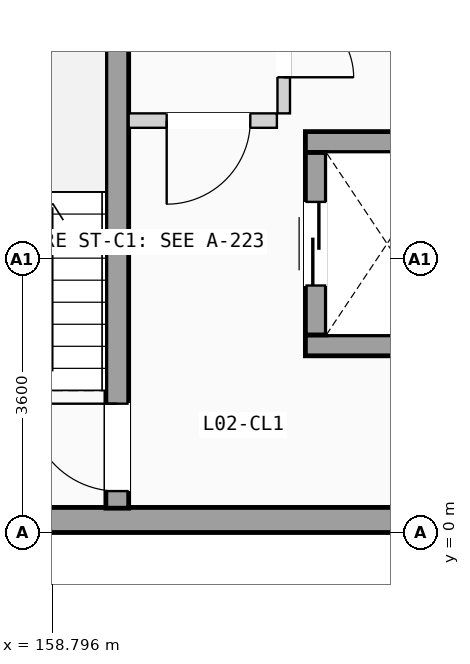
"""IFC4 building model, lengths in metres.
Left out: names, types, materials, properties, quantities, classifications, styles, units other than length and angle.
Written with IfcOpenShell. Run it as: python <this file> out.ifc"""

import sys

from ifc_helpers import new_model, si_unit, direction, frame, frame_2d, origin, place, context, subcontext, project, spatial, rectangle, extrude, element, fill, save


model = new_model("IFC4")
c1 = context("Model", 3, precision=1e-05, world=origin(), true_north=direction((0.0, 1.0)))
c2 = subcontext(c1, "Body", "Model", "MODEL_VIEW")
j1 = project(units=[si_unit("LENGTHUNIT", "METRE"), si_unit("PLANEANGLEUNIT", "RADIAN")], contexts=[c1])
p1 = place(None, origin())
s1 = spatial("IfcSite", under=j1, at=p1, CompositionType="ELEMENT")
p2 = place(p1, origin())
s2 = spatial("IfcBuilding", under=s1, at=p2, CompositionType="ELEMENT")
p3 = place(p2, frame((0.0, 0.0, 8.575)))
s3 = spatial("IfcBuildingStorey", under=s2, at=p3, CompositionType="ELEMENT", Elevation=8.575)
p4 = place(p3, frame((147.6, 0.165, 0.0), z_axis=(0.0, 0.0, 1.0), x_axis=(1.0, 0.0, 0.0)))
e1 = element("IfcWall", 1, at=p4, inside=s3, PredefinedType="SOLIDWALL", context=c2, shape_type="SweptSolid", body=[
    extrude(rectangle(XDim=25.2, YDim=0.33, at=frame_2d((12.6, 0.0))), origin(), (0.0, 0.0, 1.0), 3.24),
])
p5 = place(p3, frame((159.65, 0.32, 0.0), z_axis=(0.0, 0.0, 1.0), x_axis=(0.0, 1.0, 0.0)))
e2 = element("IfcWall", 2, at=p5, inside=s3, PredefinedType="SHEAR", context=c2, shape_type="SweptSolid", body=[
    extrude(rectangle(XDim=7.0, YDim=0.3, at=frame_2d((3.5, 0.0))), origin(), (0.0, 0.0, 1.0), 3.24),
])
p6 = place(p5, frame((0.225, 0.0, 0.0)))
e3 = element("IfcOpeningElement", 3, at=p6, cuts=e2, PredefinedType="OPENING", context=c2, shape_type="SweptSolid", body=[
    extrude(rectangle(XDim=1.15, YDim=2.12, at=frame_2d((0.575, 1.06))), frame((0.0, 0.16, 0.0), z_axis=(0.0, -1.0, 0.0), x_axis=(1.0, 0.0, 0.0)), (0.0, 0.0, 1.0), 0.32),
])
for number, where, z_axis, x_axis in (
    (4, (162.125, 2.462, 0.0), (0.0, 0.0, 1.0), (1.0, 0.0, 0.0)),
    (5, (162.125, 5.137, 0.0), (0.0, 0.0, 1.0), (1.0, 0.0, 0.0)),
):
    element("IfcWall", number, at=place(p3, frame(where, z_axis=z_axis, x_axis=x_axis)), inside=s3, PredefinedType="SHEAR", context=c2, shape_type="SweptSolid", body=[
        extrude(rectangle(XDim=2.15, YDim=0.275, at=frame_2d((1.075, 0.0))), origin(), (0.0, 0.0, 1.0), 3.24),
    ])
p7 = place(p3, frame((162.262, 2.6, 0.0), z_axis=(0.0, 0.0, 1.0), x_axis=(0.0, 1.0, 0.0)))
e6 = element("IfcWall", 6, at=p7, inside=s3, PredefinedType="SHEAR", context=c2, shape_type="SweptSolid", body=[
    extrude(rectangle(XDim=2.4, YDim=0.275, at=frame_2d((1.2, 0.0))), origin(), (0.0, 0.0, 1.0), 3.24),
])
p8 = place(p7, frame((0.65, 0.0, 0.0)))
e7 = element("IfcOpeningElement", 7, at=p8, cuts=e6, PredefinedType="OPENING", context=c2, shape_type="SweptSolid", body=[
    extrude(rectangle(XDim=1.1, YDim=2.15, at=frame_2d((0.55, 1.075))), frame((0.0, 0.147, 0.0), z_axis=(0.0, -1.0, 0.0), x_axis=(1.0, 0.0, 0.0)), (0.0, 0.0, 1.0), 0.295),
])
p9 = place(p3, frame((159.8, 5.42, 0.0), z_axis=(0.0, 0.0, 1.0), x_axis=(1.0, 0.0, 0.0)))
e8 = element("IfcWall", 8, at=p9, inside=s3, PredefinedType="PARTITIONING", context=c2, shape_type="SweptSolid", body=[
    extrude(rectangle(XDim=1.95, YDim=0.19, at=frame_2d((0.975, 0.0))), origin(), (0.0, 0.0, 1.0), 3.22),
])
p10 = place(p9, frame((0.5, 0.0, 0.0)))
e9 = element("IfcOpeningElement", 9, at=p10, cuts=e8, PredefinedType="OPENING", context=c2, shape_type="SweptSolid", body=[
    extrude(rectangle(XDim=1.1, YDim=2.12, at=frame_2d((0.55, 1.06))), frame((0.0, 0.105, 0.0), z_axis=(0.0, -1.0, 0.0), x_axis=(1.0, 0.0, 0.0)), (0.0, 0.0, 1.0), 0.21),
])
p11 = place(p3, frame((161.84, 5.515, 0.0), z_axis=(0.0, 0.0, 1.0), x_axis=(0.0, 1.0, 0.0)))
e10 = element("IfcWall", 10, at=p11, inside=s3, PredefinedType="PARTITIONING", context=c2, shape_type="SweptSolid", body=[
    extrude(rectangle(XDim=1.835, YDim=0.165, at=frame_2d((0.917, 0.0))), origin(), (0.0, 0.0, 1.0), 3.22),
])
p12 = place(p11, frame((0.475, 0.0, 0.0)))
e11 = element("IfcOpeningElement", 11, at=p12, cuts=e10, PredefinedType="OPENING", context=c2, shape_type="SweptSolid", body=[
    extrude(rectangle(XDim=0.92, YDim=2.04, at=frame_2d((0.46, 1.02))), frame((0.0, 0.093, 0.0), z_axis=(0.0, -1.0, 0.0), x_axis=(1.0, 0.0, 0.0)), (0.0, 0.0, 1.0), 0.185),
])
p13 = place(p6, origin())
e12 = element("IfcDoor", 12, at=p13, inside=s3, OperationType="SINGLE_SWING_RIGHT", PredefinedType="DOOR", context=c2, shape_type="SweptSolid", body=[
    extrude(rectangle(XDim=1.15, YDim=2.12, at=frame_2d((0.575, 1.06))), frame((0.0, 0.025, 0.0), z_axis=(0.0, -1.0, 0.0), x_axis=(1.0, 0.0, 0.0)), (0.0, 0.0, 1.0), 0.05),
])
fill(e3, e12)
p14 = place(p8, origin())
e13 = element("IfcDoor", 13, at=p14, inside=s3, OperationType="SLIDING_TO_LEFT", PredefinedType="DOOR", context=c2, shape_type="SweptSolid", body=[
    extrude(rectangle(XDim=1.1, YDim=2.15, at=frame_2d((0.55, 1.075))), frame((0.0, 0.025, 0.0), z_axis=(0.0, -1.0, 0.0), x_axis=(1.0, 0.0, 0.0)), (0.0, 0.0, 1.0), 0.05),
])
fill(e7, e13)
p15 = place(p10, frame((1.1, 0.0, 0.0), z_axis=(0.0, 0.0, 1.0), x_axis=(-1.0, 0.0, 0.0)))
e14 = element("IfcDoor", 14, at=p15, inside=s3, OperationType="SINGLE_SWING_LEFT", PredefinedType="DOOR", context=c2, shape_type="SweptSolid", body=[
    extrude(rectangle(XDim=1.1, YDim=2.12, at=frame_2d((0.55, 1.06))), frame((0.0, 0.025, 0.0), z_axis=(0.0, -1.0, 0.0), x_axis=(1.0, 0.0, 0.0)), (0.0, 0.0, 1.0), 0.05),
])
fill(e9, e14)
p16 = place(p12, frame((0.92, 0.0, 0.0), z_axis=(0.0, 0.0, 1.0), x_axis=(-1.0, 0.0, 0.0)))
e15 = element("IfcDoor", 15, at=p16, inside=s3, OperationType="SINGLE_SWING_LEFT", PredefinedType="DOOR", context=c2, shape_type="SweptSolid", body=[
    extrude(rectangle(XDim=0.92, YDim=2.04, at=frame_2d((0.46, 1.02))), frame((0.0, 0.025, 0.0), z_axis=(0.0, -1.0, 0.0), x_axis=(1.0, 0.0, 0.0)), (0.0, 0.0, 1.0), 0.05),
])
fill(e11, e15)
save(model, sys.argv[1])
